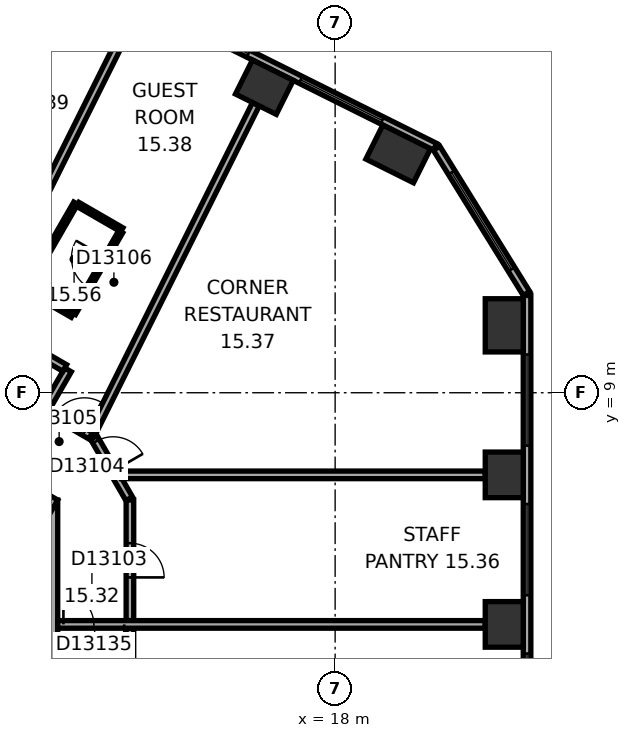
"""IFC4 building model, lengths in metres.
Left out: names, types, materials, properties, quantities, classifications, styles, units other than length and angle.
Written with IfcOpenShell. Run it as: python <this file> out.ifc"""

import sys

from ifc_helpers import new_model, si_unit, direction, frame, frame_2d, origin, origin_2d, place, context, subcontext, project, spatial, rectangle, extrude, element, fill, save


model = new_model("IFC4")
c1 = context("Model", 3, precision=1e-05, world=origin(), true_north=direction((0.0, 1.0)))
c2 = subcontext(c1, "Body", "Model", "MODEL_VIEW")
j1 = project(units=[si_unit("LENGTHUNIT", "METRE"), si_unit("PLANEANGLEUNIT", "RADIAN")], contexts=[c1])
p1 = place(None, origin())
s1 = spatial("IfcSite", under=j1, at=p1, CompositionType="ELEMENT")
p2 = place(p1, origin())
s2 = spatial("IfcBuilding", under=s1, at=p2, CompositionType="ELEMENT")
p3 = place(p2, frame((0.0, 0.0, 70.4)))
s3 = spatial("IfcBuildingStorey", under=s2, at=p3, CompositionType="ELEMENT", Elevation=70.4)
for number, where, z_axis, x_axis in (
    (1, (22.45, 2.905, 0.0), (0.0, 0.0, 1.0), (0.0, 1.0, 0.0)),
    (2, (22.45, 6.839, 0.0), (0.0, 0.0, 1.0), (0.0, 1.0, 0.0)),
):
    element("IfcColumn", number, at=place(p3, frame(where, z_axis=z_axis, x_axis=x_axis)), inside=s3, PredefinedType="COLUMN", context=c2, shape_type="SweptSolid", body=[
        extrude(rectangle(XDim=1.2, YDim=1.0, at=origin_2d()), origin(), (0.0, 0.0, 1.0), 3.3),
    ])
for number, where, z_axis, x_axis in (
    (3, (22.45, 10.774, 0.0), (0.0, 0.0, 1.0), (0.0, 1.0, 0.0)),
    (4, (19.659, 15.284, 0.0), (0.0, 0.0, 1.0), (-0.895, 0.446, 0.0)),
):
    element("IfcColumn", number, at=place(p3, frame(where, z_axis=z_axis, x_axis=x_axis)), inside=s3, PredefinedType="COLUMN", context=c2, shape_type="SweptSolid", body=[
        extrude(rectangle(XDim=1.4, YDim=1.0, at=origin_2d()), origin(), (0.0, 0.0, 1.0), 3.3),
    ])
p4 = place(p3, frame((16.138, 17.04, 0.0), z_axis=(0.0, 0.0, 1.0), x_axis=(-0.894934361602, 0.44619781311, 0.0)))
e5 = element("IfcColumn", 5, at=p4, inside=s3, PredefinedType="COLUMN", context=c2, shape_type="SweptSolid", body=[
    extrude(rectangle(XDim=1.2, YDim=1.0, at=origin_2d()), origin(), (0.0, 0.0, 1.0), 3.3),
])
p5 = place(p3, frame((10.1, -6.177, 0.0), z_axis=(0.0, 0.0, 1.0), x_axis=(0.0, 1.0, 0.0)))
e6 = element("IfcWall", 6, at=p5, inside=s3, PredefinedType="SHEAR", context=c2, shape_type="SweptSolid", body=[
    extrude(rectangle(XDim=12.355, YDim=1.2, at=frame_2d((6.177, 0.0))), origin(), (0.0, 0.0, 1.0), 3.3),
])
p6 = place(p5, frame((6.378, 0.0, 0.0)))
e7 = element("IfcOpeningElement", 7, at=p6, cuts=e6, PredefinedType="OPENING", context=c2, shape_type="SweptSolid", body=[
    extrude(rectangle(XDim=1.5, YDim=2.1, at=frame_2d((0.75, 1.05))), frame((0.0, 0.61, 0.0), z_axis=(0.0, -1.0, 0.0), x_axis=(1.0, 0.0, 0.0)), (0.0, 0.0, 1.0), 1.22),
])
p7 = place(p5, frame((1.828, 0.0, 0.0)))
e8 = element("IfcOpeningElement", 8, at=p7, cuts=e6, PredefinedType="OPENING", context=c2, shape_type="SweptSolid", body=[
    extrude(rectangle(XDim=1.1, YDim=2.1, at=frame_2d((0.55, 1.05))), frame((0.0, 0.61, 0.0), z_axis=(0.0, -1.0, 0.0), x_axis=(1.0, 0.0, 0.0)), (0.0, 0.0, 1.0), 1.22),
])
p8 = place(p5, frame((4.427, 0.0, 0.0)))
e9 = element("IfcOpeningElement", 9, at=p8, cuts=e6, PredefinedType="OPENING", context=c2, shape_type="SweptSolid", body=[
    extrude(rectangle(XDim=1.1, YDim=2.1, at=frame_2d((0.55, 1.05))), frame((0.0, 0.61, 0.0), z_axis=(0.0, -1.0, 0.0), x_axis=(1.0, 0.0, 0.0)), (0.0, 0.0, 1.0), 1.22),
])
p9 = place(p3, frame((10.4, 5.658, 0.0), z_axis=(0.0, 0.0, 1.0), x_axis=(-0.866021384402, 0.500006961711, 0.0)))
e10 = element("IfcWall", 10, at=p9, inside=s3, PredefinedType="SHEAR", context=c2, shape_type="SweptSolid", body=[
    extrude(rectangle(XDim=12.355, YDim=1.2, at=frame_2d((6.178, 0.0))), origin(), (0.0, 0.0, 1.0), 3.3),
])
p10 = place(p9, frame((2.728, 0.0, 0.0)))
e11 = element("IfcOpeningElement", 11, at=p10, cuts=e10, PredefinedType="OPENING", context=c2, shape_type="SweptSolid", body=[
    extrude(rectangle(XDim=1.1, YDim=2.1, at=frame_2d((0.55, 1.05))), frame((0.0, 0.61, 0.0), z_axis=(0.0, -1.0, 0.0), x_axis=(1.0, 0.0, 0.0)), (0.0, 0.0, 1.0), 1.22),
])
p11 = place(p9, frame((5.328, 0.0, 0.0)))
e12 = element("IfcOpeningElement", 12, at=p11, cuts=e10, PredefinedType="OPENING", context=c2, shape_type="SweptSolid", body=[
    extrude(rectangle(XDim=1.1, YDim=2.1, at=frame_2d((0.55, 1.05))), frame((0.0, 0.61, 0.0), z_axis=(0.0, -1.0, 0.0), x_axis=(1.0, 0.0, 0.0)), (0.0, 0.0, 1.0), 1.22),
])
p12 = place(p9, frame((7.928, 0.0, 0.0)))
e13 = element("IfcOpeningElement", 13, at=p12, cuts=e10, PredefinedType="OPENING", context=c2, shape_type="SweptSolid", body=[
    extrude(rectangle(XDim=1.1, YDim=2.1, at=frame_2d((0.55, 1.05))), frame((0.0, 0.61, 0.0), z_axis=(0.0, -1.0, 0.0), x_axis=(1.0, 0.0, 0.0)), (0.0, 0.0, 1.0), 1.22),
])
p13 = place(p3, frame((23.05, -9.687, 0.0), z_axis=(0.0, 0.0, 1.0), x_axis=(0.0, 1.0, 0.0)))
e14 = element("IfcWall", 14, at=p13, inside=s3, PredefinedType="STANDARD", context=c2, shape_type="SweptSolid", body=[
    extrude(rectangle(XDim=21.246, YDim=0.2, at=frame_2d((10.623, 0.0))), origin(), (0.0, 0.0, 1.0), 3.3),
])
p14 = place(p13, frame((1.555, 0.0, 0.8)))
e15 = element("IfcOpeningElement", 15, at=p14, cuts=e14, PredefinedType="OPENING", context=c2, shape_type="SweptSolid", body=[
    extrude(rectangle(XDim=2.4, YDim=1.7, at=frame_2d((1.2, 0.85))), frame((0.0, 0.11, 0.0), z_axis=(0.0, -1.0, 0.0), x_axis=(1.0, 0.0, 0.0)), (0.0, 0.0, 1.0), 0.22),
])
p15 = place(p13, frame((5.489, 0.0, 0.8)))
e16 = element("IfcOpeningElement", 16, at=p15, cuts=e14, PredefinedType="OPENING", context=c2, shape_type="SweptSolid", body=[
    extrude(rectangle(XDim=2.4, YDim=1.7, at=frame_2d((1.2, 0.85))), frame((0.0, 0.11, 0.0), z_axis=(0.0, -1.0, 0.0), x_axis=(1.0, 0.0, 0.0)), (0.0, 0.0, 1.0), 0.22),
])
p16 = place(p13, frame((9.424, 0.0, 0.8)))
e17 = element("IfcOpeningElement", 17, at=p16, cuts=e14, PredefinedType="OPENING", context=c2, shape_type="SweptSolid", body=[
    extrude(rectangle(XDim=2.4, YDim=1.7, at=frame_2d((1.2, 0.85))), frame((0.0, 0.11, 0.0), z_axis=(0.0, -1.0, 0.0), x_axis=(1.0, 0.0, 0.0)), (0.0, 0.0, 1.0), 0.22),
])
p17 = place(p13, frame((13.358, 0.0, 0.8)))
e18 = element("IfcOpeningElement", 18, at=p17, cuts=e14, PredefinedType="OPENING", context=c2, shape_type="SweptSolid", body=[
    extrude(rectangle(XDim=2.4, YDim=1.7, at=frame_2d((1.2, 0.85))), frame((0.0, 0.11, 0.0), z_axis=(0.0, -1.0, 0.0), x_axis=(1.0, 0.0, 0.0)), (0.0, 0.0, 1.0), 0.22),
])
p18 = place(p13, frame((17.293, 0.0, 0.8)))
e19 = element("IfcOpeningElement", 19, at=p18, cuts=e14, PredefinedType="OPENING", context=c2, shape_type="SweptSolid", body=[
    extrude(rectangle(XDim=2.4, YDim=1.7, at=frame_2d((1.2, 0.85))), frame((0.0, 0.11, 0.0), z_axis=(0.0, -1.0, 0.0), x_axis=(1.0, 0.0, 0.0)), (0.0, 0.0, 1.0), 0.22),
])
p19 = place(p3, frame((23.035, 11.612, 0.0), z_axis=(0.0, 0.0, 1.0), x_axis=(-0.526160091227, 0.850385535155, 0.0)))
e20 = element("IfcWall", 20, at=p19, inside=s3, PredefinedType="STANDARD", context=c2, shape_type="SweptSolid", body=[
    extrude(rectangle(XDim=4.494, YDim=0.2, at=frame_2d((2.247, 0.0))), origin(), (0.0, 0.0, 1.0), 3.3),
])
p20 = place(p19, frame((0.747, 0.0, 0.8)))
e21 = element("IfcOpeningElement", 21, at=p20, cuts=e20, PredefinedType="OPENING", context=c2, shape_type="SweptSolid", body=[
    extrude(rectangle(XDim=3.0, YDim=1.7, at=frame_2d((1.5, 0.85))), frame((0.0, 0.11, 0.0), z_axis=(0.0, -1.0, 0.0), x_axis=(1.0, 0.0, 0.0)), (0.0, 0.0, 1.0), 0.22),
])
p21 = place(p3, frame((20.63, 15.47, 0.0), z_axis=(0.0, 0.0, 1.0), x_axis=(-0.894934518609, 0.446197498203, 0.0)))
e22 = element("IfcWall", 22, at=p21, inside=s3, PredefinedType="STANDARD", context=c2, shape_type="SweptSolid", body=[
    extrude(rectangle(XDim=21.246, YDim=0.2, at=frame_2d((10.623, 0.0))), origin(), (0.0, 0.0, 1.0), 3.3),
])
p22 = place(p21, frame((1.553, 0.0, 0.8)))
e23 = element("IfcOpeningElement", 23, at=p22, cuts=e22, PredefinedType="OPENING", context=c2, shape_type="SweptSolid", body=[
    extrude(rectangle(XDim=2.4, YDim=1.7, at=frame_2d((1.2, 0.85))), frame((0.0, 0.11, 0.0), z_axis=(0.0, -1.0, 0.0), x_axis=(1.0, 0.0, 0.0)), (0.0, 0.0, 1.0), 0.22),
])
p23 = place(p21, frame((5.488, 0.0, 0.8)))
e24 = element("IfcOpeningElement", 24, at=p23, cuts=e22, PredefinedType="OPENING", context=c2, shape_type="SweptSolid", body=[
    extrude(rectangle(XDim=2.4, YDim=1.7, at=frame_2d((1.2, 0.85))), frame((0.0, 0.11, 0.0), z_axis=(0.0, -1.0, 0.0), x_axis=(1.0, 0.0, 0.0)), (0.0, 0.0, 1.0), 0.22),
])
p24 = place(p21, frame((9.422, 0.0, 0.8)))
e25 = element("IfcOpeningElement", 25, at=p24, cuts=e22, PredefinedType="OPENING", context=c2, shape_type="SweptSolid", body=[
    extrude(rectangle(XDim=2.4, YDim=1.7, at=frame_2d((1.2, 0.85))), frame((0.0, 0.11, 0.0), z_axis=(0.0, -1.0, 0.0), x_axis=(1.0, 0.0, 0.0)), (0.0, 0.0, 1.0), 0.22),
])
p25 = place(p21, frame((13.357, 0.0, 0.8)))
e26 = element("IfcOpeningElement", 26, at=p25, cuts=e22, PredefinedType="OPENING", context=c2, shape_type="SweptSolid", body=[
    extrude(rectangle(XDim=2.4, YDim=1.7, at=frame_2d((1.2, 0.85))), frame((0.0, 0.11, 0.0), z_axis=(0.0, -1.0, 0.0), x_axis=(1.0, 0.0, 0.0)), (0.0, 0.0, 1.0), 0.22),
])
p26 = place(p21, frame((17.292, 0.0, 0.8)))
e27 = element("IfcOpeningElement", 27, at=p26, cuts=e22, PredefinedType="OPENING", context=c2, shape_type="SweptSolid", body=[
    extrude(rectangle(XDim=2.4, YDim=1.7, at=frame_2d((1.2, 0.85))), frame((0.0, 0.11, 0.0), z_axis=(0.0, -1.0, 0.0), x_axis=(1.0, 0.0, 0.0)), (0.0, 0.0, 1.0), 0.22),
])
p27 = place(p3, frame((9.875, 11.736, 0.0), z_axis=(0.0, 0.0, 1.0), x_axis=(0.499936506574, 0.866062058628, 0.0)))
e28 = element("IfcWall", 28, at=p27, inside=s3, PredefinedType="PARTITIONING", context=c2, shape_type="SweptSolid", body=[
    extrude(rectangle(XDim=2.6, YDim=0.12, at=frame_2d((1.3, 0.0))), origin(), (0.0, 0.0, 1.0), 3.05),
])
p28 = place(p3, frame((10.371, 8.561, 0.0), z_axis=(0.0, 0.0, 1.0), x_axis=(0.499986357472, 0.866033280158, 0.0)))
e29 = element("IfcWall", 29, at=p28, inside=s3, PredefinedType="PARTITIONING", context=c2, shape_type="SweptSolid", body=[
    extrude(rectangle(XDim=1.201, YDim=0.2, at=frame_2d((0.601, 0.0))), origin(), (0.0, 0.0, 1.0), 3.05),
])
p29 = place(p3, frame((10.885, 9.652, 0.0), z_axis=(0.0, 0.0, 1.0), x_axis=(-0.866033868542, 0.499985338323, 0.0)))
e30 = element("IfcWall", 30, at=p29, inside=s3, PredefinedType="PARTITIONING", context=c2, shape_type="SweptSolid", body=[
    extrude(rectangle(XDim=8.602, YDim=0.2, at=frame_2d((4.301, 0.0))), origin(), (0.0, 0.0, 1.0), 3.05),
])
p30 = place(p29, frame((5.302, 0.0, 0.0)))
e31 = element("IfcOpeningElement", 31, at=p30, cuts=e30, PredefinedType="OPENING", context=c2, shape_type="SweptSolid", body=[
    extrude(rectangle(XDim=0.9, YDim=2.1, at=frame_2d((0.45, 1.05))), frame((0.0, 0.11, 0.0), z_axis=(0.0, -1.0, 0.0), x_axis=(1.0, 0.0, 0.0)), (0.0, 0.0, 1.0), 0.22),
])
for number, where, z_axis, x_axis in (
    (32, (11.087, 11.036, 0.0), (0.0, 0.0, 1.0), (-0.866, 0.5, 0.0)),
    (33, (11.226, 13.958, 0.0), (0.0, 0.0, 1.0), (0.866, -0.5, 0.0)),
):
    element("IfcWall", number, at=place(p3, frame(where, z_axis=z_axis, x_axis=x_axis)), inside=s3, PredefinedType="PARTITIONING", context=c2, shape_type="SweptSolid", body=[
        extrude(rectangle(XDim=1.34, YDim=0.12, at=frame_2d((0.67, 0.0))), origin(), (0.0, 0.0, 1.0), 3.05),
    ])
p31 = place(p3, frame((11.566, 7.871, 0.0), z_axis=(0.0, 0.0, 1.0), x_axis=(-0.866004557827, 0.500036104519, 0.0)))
e34 = element("IfcWall", 34, at=p31, inside=s3, PredefinedType="PARTITIONING", context=c2, shape_type="SweptSolid", body=[
    extrude(rectangle(XDim=1.28, YDim=0.2, at=frame_2d((0.64, 0.0))), origin(), (0.0, 0.0, 1.0), 3.05),
])
p32 = place(p31, frame((0.19, 0.0, 0.0)))
e35 = element("IfcOpeningElement", 35, at=p32, cuts=e34, PredefinedType="OPENING", context=c2, shape_type="SweptSolid", body=[
    extrude(rectangle(XDim=0.9, YDim=2.1, at=frame_2d((0.45, 1.05))), frame((0.0, 0.11, 0.0), z_axis=(0.0, -1.0, 0.0), x_axis=(1.0, 0.0, 0.0)), (0.0, 0.0, 1.0), 0.22),
])
p33 = place(p3, frame((12.357, 13.236, 0.0), z_axis=(0.0, 0.0, 1.0), x_axis=(-0.50000366821, -0.866023285932, 0.0)))
e36 = element("IfcWall", 36, at=p33, inside=s3, PredefinedType="PARTITIONING", context=c2, shape_type="SweptSolid", body=[
    extrude(rectangle(XDim=2.48, YDim=0.12, at=frame_2d((1.24, 0.0))), origin(), (0.0, 0.0, 1.0), 3.05),
])
p34 = place(p33, frame((0.79, 0.0, 0.0)))
e37 = element("IfcOpeningElement", 37, at=p34, cuts=e36, PredefinedType="OPENING", context=c2, shape_type="SweptSolid", body=[
    extrude(rectangle(XDim=0.9, YDim=2.1, at=frame_2d((0.45, 1.05))), frame((0.0, 0.07, 0.0), z_axis=(0.0, -1.0, 0.0), x_axis=(1.0, 0.0, 0.0)), (0.0, 0.0, 1.0), 0.14),
])
p35 = place(p3, frame((12.393, 18.348, 0.0), z_axis=(0.0, 0.0, 1.0), x_axis=(-0.446176022699, -0.894945225569, 0.0)))
e38 = element("IfcWall", 38, at=p35, inside=s3, PredefinedType="PARTITIONING", context=c2, shape_type="SweptSolid", body=[
    extrude(rectangle(XDim=8.191, YDim=0.2, at=frame_2d((4.095, 0.0))), origin(), (0.0, 0.0, 1.0), 2.6),
])
p36 = place(p3, frame((12.58, 6.212, 0.0), z_axis=(0.0, 0.0, 1.0), x_axis=(-0.500063286585, 0.865988862174, 0.0)))
e39 = element("IfcWall", 39, at=p36, inside=s3, PredefinedType="PARTITIONING", context=c2, shape_type="SweptSolid", body=[
    extrude(rectangle(XDim=1.86, YDim=0.2, at=frame_2d((0.93, 0.0))), origin(), (0.0, 0.0, 1.0), 3.05),
])
p37 = place(p36, frame((0.842, 0.0, 0.0)))
e40 = element("IfcOpeningElement", 40, at=p37, cuts=e39, PredefinedType="OPENING", context=c2, shape_type="SweptSolid", body=[
    extrude(rectangle(XDim=0.9, YDim=2.1, at=frame_2d((0.45, 1.05))), frame((0.0, 0.11, 0.0), z_axis=(0.0, -1.0, 0.0), x_axis=(1.0, 0.0, 0.0)), (0.0, 0.0, 1.0), 0.22),
])
p38 = place(p3, frame((12.6, 0.201, 0.0), z_axis=(0.0, 0.0, 1.0), x_axis=(0.0, 1.0, 0.0)))
e41 = element("IfcWall", 41, at=p38, inside=s3, PredefinedType="PARTITIONING", context=c2, shape_type="SweptSolid", body=[
    extrude(rectangle(XDim=2.604, YDim=0.2, at=frame_2d((1.302, 0.0))), origin(), (0.0, 0.0, 1.0), 3.05),
])
p39 = place(p38, frame((0.852, 0.0, 0.0)))
e42 = element("IfcOpeningElement", 42, at=p39, cuts=e41, PredefinedType="OPENING", context=c2, shape_type="SweptSolid", body=[
    extrude(rectangle(XDim=0.9, YDim=2.1, at=frame_2d((0.45, 1.05))), frame((0.0, 0.11, 0.0), z_axis=(0.0, -1.0, 0.0), x_axis=(1.0, 0.0, 0.0)), (0.0, 0.0, 1.0), 0.22),
])
p40 = place(p3, frame((12.6, 3.004, 0.0), z_axis=(0.0, 0.0, 1.0), x_axis=(0.0, 1.0, 0.0)))
e43 = element("IfcWall", 43, at=p40, inside=s3, PredefinedType="PARTITIONING", context=c2, shape_type="SweptSolid", body=[
    extrude(rectangle(XDim=3.173, YDim=0.2, at=frame_2d((1.586, 0.0))), origin(), (0.0, 0.0, 1.0), 3.05),
])
p41 = place(p40, frame((1.136, 0.0, 0.0)))
e44 = element("IfcOpeningElement", 44, at=p41, cuts=e43, PredefinedType="OPENING", context=c2, shape_type="SweptSolid", body=[
    extrude(rectangle(XDim=0.9, YDim=2.1, at=frame_2d((0.45, 1.05))), frame((0.0, 0.11, 0.0), z_axis=(0.0, -1.0, 0.0), x_axis=(1.0, 0.0, 0.0)), (0.0, 0.0, 1.0), 0.22),
])
p42 = place(p3, frame((15.915, 16.592, 0.0), z_axis=(0.0, 0.0, 1.0), x_axis=(-0.446199736347, -0.894933402709, 0.0)))
e45 = element("IfcWall", 45, at=p42, inside=s3, PredefinedType="PARTITIONING", context=c2, shape_type="SweptSolid", body=[
    extrude(rectangle(XDim=9.635, YDim=0.2, at=frame_2d((4.817, 0.0))), origin(), (0.0, 0.0, 1.0), 3.05),
])
p43 = place(p3, frame((21.95, 2.905, 0.0), z_axis=(0.0, 0.0, 1.0), x_axis=(-1.0, 0.0, 0.0)))
e46 = element("IfcWall", 46, at=p43, inside=s3, PredefinedType="PARTITIONING", context=c2, shape_type="SweptSolid", body=[
    extrude(rectangle(XDim=11.25, YDim=0.2, at=frame_2d((5.625, 0.0))), origin(), (0.0, 0.0, 1.0), 3.05),
])
p44 = place(p43, frame((9.5, 0.0, 0.0)))
e47 = element("IfcOpeningElement", 47, at=p44, cuts=e46, PredefinedType="OPENING", context=c2, shape_type="SweptSolid", body=[
    extrude(rectangle(XDim=1.6, YDim=2.1, at=frame_2d((0.8, 1.05))), frame((0.0, 0.11, 0.0), z_axis=(0.0, -1.0, 0.0), x_axis=(1.0, 0.0, 0.0)), (0.0, 0.0, 1.0), 0.22),
])
p45 = place(p3, frame((21.95, 6.839, 0.0), z_axis=(0.0, 0.0, 1.0), x_axis=(-1.0, 0.0, 0.0)))
e48 = element("IfcWall", 48, at=p45, inside=s3, PredefinedType="PARTITIONING", context=c2, shape_type="SweptSolid", body=[
    extrude(rectangle(XDim=9.572, YDim=0.2, at=frame_2d((4.786, 0.0))), origin(), (0.0, 0.0, 1.0), 3.05),
])
p46 = place(p16, origin())
e49 = element("IfcWindow", 49, at=p46, inside=s3, PartitioningType="SINGLE_PANEL", PredefinedType="WINDOW", context=c2, shape_type="SweptSolid", body=[
    extrude(rectangle(XDim=2.4, YDim=1.7, at=frame_2d((1.2, 0.85))), frame((0.0, 0.03, 0.0), z_axis=(0.0, -1.0, 0.0), x_axis=(1.0, 0.0, 0.0)), (0.0, 0.0, 1.0), 0.06),
])
fill(e17, e49)
p47 = place(p17, origin())
e50 = element("IfcWindow", 50, at=p47, inside=s3, PartitioningType="SINGLE_PANEL", PredefinedType="WINDOW", context=c2, shape_type="SweptSolid", body=[
    extrude(rectangle(XDim=2.4, YDim=1.7, at=frame_2d((1.2, 0.85))), frame((0.0, 0.03, 0.0), z_axis=(0.0, -1.0, 0.0), x_axis=(1.0, 0.0, 0.0)), (0.0, 0.0, 1.0), 0.06),
])
fill(e18, e50)
p48 = place(p18, origin())
e51 = element("IfcWindow", 51, at=p48, inside=s3, PartitioningType="SINGLE_PANEL", PredefinedType="WINDOW", context=c2, shape_type="SweptSolid", body=[
    extrude(rectangle(XDim=2.4, YDim=1.7, at=frame_2d((1.2, 0.85))), frame((0.0, 0.03, 0.0), z_axis=(0.0, -1.0, 0.0), x_axis=(1.0, 0.0, 0.0)), (0.0, 0.0, 1.0), 0.06),
])
fill(e19, e51)
p49 = place(p20, origin())
e52 = element("IfcWindow", 52, at=p49, inside=s3, PartitioningType="SINGLE_PANEL", PredefinedType="WINDOW", context=c2, shape_type="SweptSolid", body=[
    extrude(rectangle(XDim=3.0, YDim=1.7, at=frame_2d((1.5, 0.85))), frame((0.0, 0.03, 0.0), z_axis=(0.0, -1.0, 0.0), x_axis=(1.0, 0.0, 0.0)), (0.0, 0.0, 1.0), 0.06),
])
fill(e21, e52)
p50 = place(p22, origin())
e53 = element("IfcWindow", 53, at=p50, inside=s3, PartitioningType="SINGLE_PANEL", PredefinedType="WINDOW", context=c2, shape_type="SweptSolid", body=[
    extrude(rectangle(XDim=2.4, YDim=1.7, at=frame_2d((1.2, 0.85))), frame((0.0, 0.03, 0.0), z_axis=(0.0, -1.0, 0.0), x_axis=(1.0, 0.0, 0.0)), (0.0, 0.0, 1.0), 0.06),
])
fill(e23, e53)
p51 = place(p23, origin())
e54 = element("IfcWindow", 54, at=p51, inside=s3, PartitioningType="SINGLE_PANEL", PredefinedType="WINDOW", context=c2, shape_type="SweptSolid", body=[
    extrude(rectangle(XDim=2.4, YDim=1.7, at=frame_2d((1.2, 0.85))), frame((0.0, 0.03, 0.0), z_axis=(0.0, -1.0, 0.0), x_axis=(1.0, 0.0, 0.0)), (0.0, 0.0, 1.0), 0.06),
])
fill(e24, e54)
p52 = place(p41, origin())
e55 = element("IfcDoor", 55, at=p52, inside=s3, OperationType="SINGLE_SWING_LEFT", PredefinedType="DOOR", context=c2, shape_type="SweptSolid", body=[
    extrude(rectangle(XDim=0.9, YDim=2.1, at=frame_2d((0.45, 1.05))), frame((0.0, 0.025, 0.0), z_axis=(0.0, -1.0, 0.0), x_axis=(1.0, 0.0, 0.0)), (0.0, 0.0, 1.0), 0.05),
])
fill(e44, e55)
p53 = place(p37, origin())
e56 = element("IfcDoor", 56, at=p53, inside=s3, OperationType="SINGLE_SWING_LEFT", PredefinedType="DOOR", context=c2, shape_type="SweptSolid", body=[
    extrude(rectangle(XDim=0.9, YDim=2.1, at=frame_2d((0.45, 1.05))), frame((0.0, 0.025, 0.0), z_axis=(0.0, -1.0, 0.0), x_axis=(1.0, 0.0, 0.0)), (0.0, 0.0, 1.0), 0.05),
])
fill(e40, e56)
p54 = place(p32, origin())
e57 = element("IfcDoor", 57, at=p54, inside=s3, OperationType="SINGLE_SWING_LEFT", PredefinedType="DOOR", context=c2, shape_type="SweptSolid", body=[
    extrude(rectangle(XDim=0.9, YDim=2.1, at=frame_2d((0.45, 1.05))), frame((0.0, 0.025, 0.0), z_axis=(0.0, -1.0, 0.0), x_axis=(1.0, 0.0, 0.0)), (0.0, 0.0, 1.0), 0.05),
])
fill(e35, e57)
p55 = place(p34, origin())
e58 = element("IfcDoor", 58, at=p55, inside=s3, OperationType="SINGLE_SWING_LEFT", PredefinedType="DOOR", context=c2, shape_type="SweptSolid", body=[
    extrude(rectangle(XDim=0.9, YDim=2.1, at=frame_2d((0.45, 1.05))), frame((0.0, 0.025, 0.0), z_axis=(0.0, -1.0, 0.0), x_axis=(1.0, 0.0, 0.0)), (0.0, 0.0, 1.0), 0.05),
])
fill(e37, e58)
p56 = place(p44, origin())
e59 = element("IfcDoor", 59, at=p56, inside=s3, OperationType="DOUBLE_DOOR_SINGLE_SWING", PredefinedType="DOOR", context=c2, shape_type="SweptSolid", body=[
    extrude(rectangle(XDim=1.6, YDim=2.1, at=frame_2d((0.8, 1.05))), frame((0.0, 0.025, 0.0), z_axis=(0.0, -1.0, 0.0), x_axis=(1.0, 0.0, 0.0)), (0.0, 0.0, 1.0), 0.05),
])
fill(e47, e59)
save(model, sys.argv[1])
